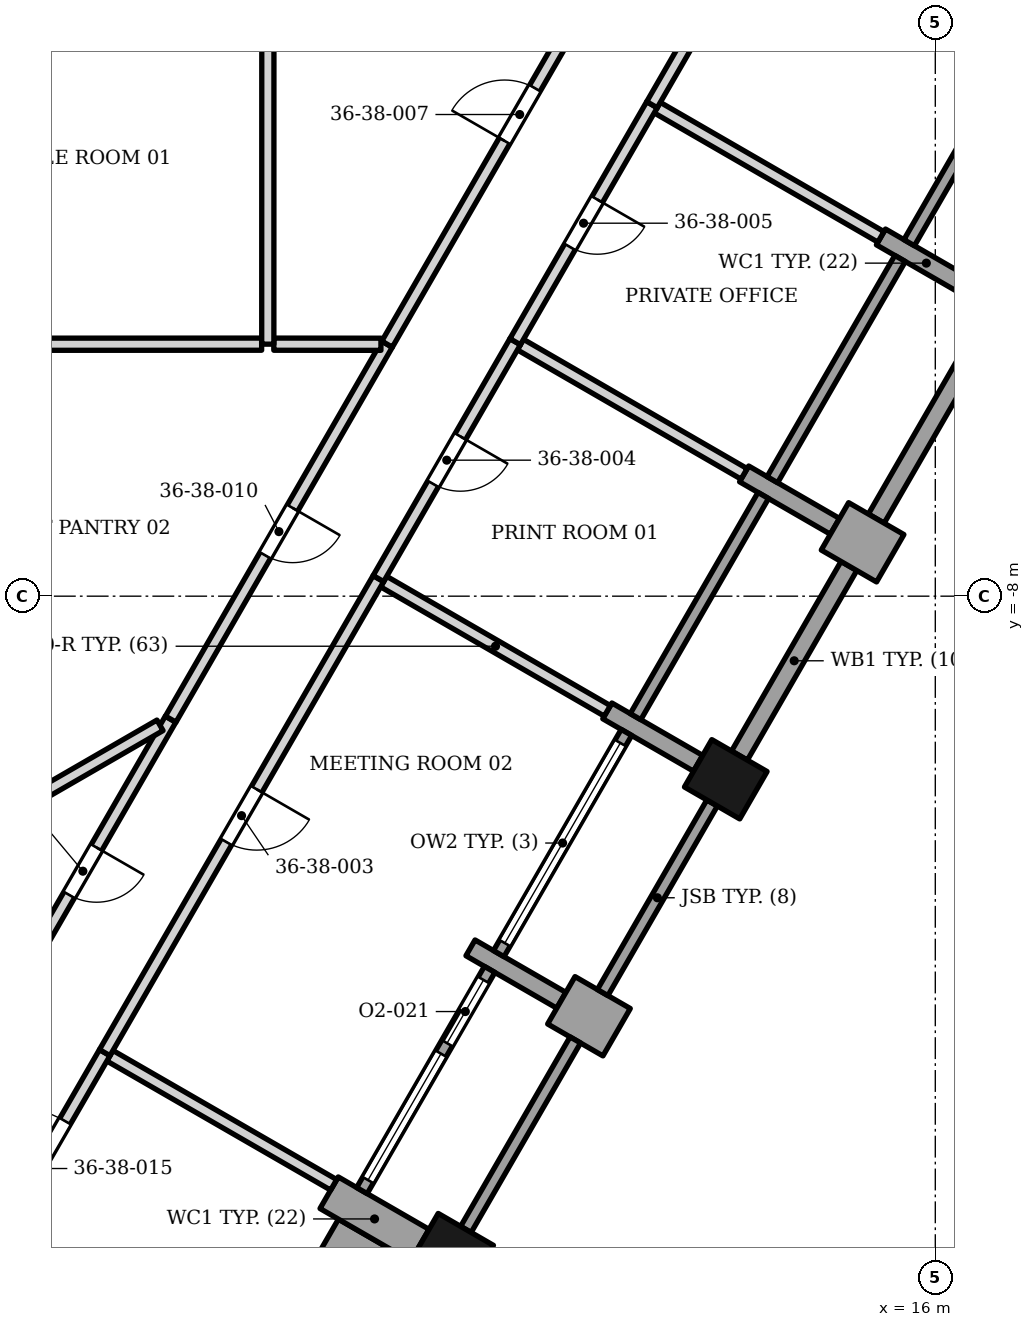
"""IFC4 building model, lengths in metres.
Left out: names, types, materials, properties, quantities, classifications, styles, units other than length and angle.
Written with IfcOpenShell. Run it as: python <this file> out.ifc"""

import sys

from ifc_helpers import new_model, si_unit, direction, frame, frame_2d, origin, origin_2d, place, context, subcontext, project, spatial, polyline, rectangle, outline, extrude, element, fill, save


model = new_model("IFC4")
c1 = context("Model", 3, precision=1e-05, world=origin(), true_north=direction((0.0, 1.0)))
c2 = subcontext(c1, "Body", "Model", "MODEL_VIEW")
j1 = project(units=[si_unit("LENGTHUNIT", "METRE"), si_unit("PLANEANGLEUNIT", "RADIAN")], contexts=[c1])
p1 = place(None, origin())
s1 = spatial("IfcSite", under=j1, at=p1, CompositionType="ELEMENT")
p2 = place(p1, origin())
s2 = spatial("IfcBuilding", under=s1, at=p2, CompositionType="ELEMENT")
p3 = place(p2, frame((0.0, 0.0, 156.3)))
s3 = spatial("IfcBuildingStorey", under=s2, at=p3, CompositionType="ELEMENT", Elevation=156.3)
for number, where, z_axis, x_axis in (
    (1, (8.054, -18.803, 0.0), (0.0, 0.0, 1.0), (0.5, 0.866, 0.0)),
    (2, (12.554, -11.011, 0.0), (0.0, 0.0, 1.0), (0.5, 0.866, 0.0)),
):
    element("IfcColumn", number, at=place(p3, frame(where, z_axis=z_axis, x_axis=x_axis)), inside=s3, PredefinedType="COLUMN", context=c2, shape_type="SweptSolid", body=[
        extrude(rectangle(XDim=0.9, YDim=1.05, at=origin_2d()), origin(), (0.0, 0.0, 1.0), 3.9),
    ])
p4 = place(p3, frame((7.525, -18.673, 0.0), z_axis=(0.0, 0.0, 1.0), x_axis=(-0.866074815912, 0.499914405916, 0.0)))
e3 = element("IfcWall", 3, at=p4, inside=s3, PredefinedType="SOLIDWALL", context=c2, shape_type="SweptSolid", body=[
    extrude(rectangle(XDim=1.725, YDim=0.6, at=frame_2d((0.862, 0.0))), origin(), (0.0, 0.0, 1.0), 3.0),
])
p5 = place(p3, frame((9.85, -14.646, 0.0), z_axis=(0.0, 0.0, 1.0), x_axis=(0.866030680601, -0.499990860175, 0.0)))
e4 = element("IfcWall", 4, at=p5, inside=s3, PredefinedType="SOLIDWALL", context=c2, shape_type="SweptSolid", body=[
    extrude(rectangle(XDim=1.05, YDim=0.9, at=frame_2d((0.525, 0.0))), origin(), (0.0, 0.0, 1.0), 3.0),
])
p6 = place(p3, frame((8.356, -13.783, 0.0), z_axis=(0.0, 0.0, 1.0), x_axis=(0.866013532718, -0.500020560727, 0.0)))
e5 = element("IfcWall", 5, at=p6, inside=s3, PredefinedType="SOLIDWALL", context=c2, shape_type="SweptSolid", body=[
    extrude(rectangle(XDim=1.725, YDim=0.3, at=frame_2d((0.863, 0.0))), origin(), (0.0, 0.0, 1.0), 3.0),
])
p7 = place(p3, frame((12.099, -10.749, 0.0), z_axis=(0.0, 0.0, 1.0), x_axis=(-0.86597814115, 0.500081852351, 0.0)))
e6 = element("IfcWall", 6, at=p7, inside=s3, PredefinedType="SOLIDWALL", context=c2, shape_type="SweptSolid", body=[
    extrude(rectangle(XDim=1.725, YDim=0.3, at=frame_2d((0.862, 0.0))), origin(), (0.0, 0.0, 1.0), 3.0),
])
p8 = place(p3, frame((14.35, -6.852, 0.0), z_axis=(0.0, 0.0, 1.0), x_axis=(0.866030680601, -0.499990860175, 0.0)))
e7 = element("IfcWall", 7, at=p8, inside=s3, PredefinedType="SOLIDWALL", context=c2, shape_type="SweptSolid", body=[
    extrude(rectangle(XDim=1.05, YDim=0.9, at=frame_2d((0.525, 0.0))), origin(), (0.0, 0.0, 1.0), 3.0),
])
p9 = place(p3, frame((14.35, -6.852, 0.0), z_axis=(0.0, 0.0, 1.0), x_axis=(-0.866013532718, 0.500020560727, 0.0)))
e8 = element("IfcWall", 8, at=p9, inside=s3, PredefinedType="SOLIDWALL", context=c2, shape_type="SweptSolid", body=[
    extrude(rectangle(XDim=1.725, YDim=0.3, at=frame_2d((0.863, 0.0))), origin(), (0.0, 0.0, 1.0), 3.0),
])
p10 = place(p3, frame((16.599, -2.954, 0.0), z_axis=(0.0, 0.0, 1.0), x_axis=(-0.86597814115, 0.500081852351, 0.0)))
e9 = element("IfcWall", 9, at=p10, inside=s3, PredefinedType="SOLIDWALL", context=c2, shape_type="SweptSolid", body=[
    extrude(rectangle(XDim=1.725, YDim=0.3, at=frame_2d((0.862, 0.0))), origin(), (0.0, 0.0, 1.0), 3.0),
])
p11 = place(p3, origin())
e10 = element("IfcWall", 10, at=p11, inside=s3, PredefinedType="SOLIDWALL", context=c2, shape_type="SweptSolid", body=[
    extrude(outline(polyline([(9.993, -15.248), (8.194, -18.364), (8.367, -18.464), (10.166, -15.348), (9.993, -15.248)])), origin(), (0.0, 0.0, 1.0), 3.0),
])
p12 = place(p3, frame((6.57, -17.775, 0.0), z_axis=(0.0, 0.0, 1.0), x_axis=(0.500027713859, 0.866009402589, 0.0)))
e11 = element("IfcWall", 11, at=p12, inside=s3, PredefinedType="ELEMENTEDWALL", context=c2, shape_type="SweptSolid", body=[
    extrude(rectangle(XDim=4.2, YDim=0.2, at=frame_2d((2.1, 0.0))), origin(), (0.0, 0.0, 1.0), 3.0),
])
p13 = place(p12, frame((0.2, 0.0, 0.45)))
e12 = element("IfcOpeningElement", 12, at=p13, cuts=e11, PredefinedType="OPENING", context=c2, shape_type="SweptSolid", body=[
    extrude(rectangle(XDim=2.4, YDim=2.25, at=frame_2d((1.2, 1.125))), frame((0.0, 0.11, 0.0), z_axis=(0.0, -1.0, 0.0), x_axis=(1.0, 0.0, 0.0)), (0.0, 0.0, 1.0), 0.22),
])
p14 = place(p12, frame((2.8, 0.0, 0.0)))
e13 = element("IfcOpeningElement", 13, at=p14, cuts=e11, PredefinedType="OPENING", context=c2, shape_type="SweptSolid", body=[
    extrude(rectangle(XDim=1.2, YDim=2.7, at=frame_2d((0.6, 1.35))), frame((0.0, 0.11, 0.0), z_axis=(0.0, -1.0, 0.0), x_axis=(1.0, 0.0, 0.0)), (0.0, 0.0, 1.0), 0.22),
])
p15 = place(p3, frame((10.529, -14.519, 0.0), z_axis=(0.0, 0.0, 1.0), x_axis=(0.500012057535, 0.866018442252, 0.0)))
e14 = element("IfcWall", 14, at=p15, inside=s3, PredefinedType="SOLIDWALL", context=c2, shape_type="SweptSolid", body=[
    extrude(rectangle(XDim=3.6, YDim=0.2, at=frame_2d((1.8, 0.0))), origin(), (0.0, 0.0, 1.0), 3.0),
])
p16 = place(p3, frame((8.82, -13.878, 0.0), z_axis=(0.0, 0.0, 1.0), x_axis=(0.500027713859, 0.866009402589, 0.0)))
e15 = element("IfcWall", 15, at=p16, inside=s3, PredefinedType="ELEMENTEDWALL", context=c2, shape_type="SweptSolid", body=[
    extrude(rectangle(XDim=4.2, YDim=0.2, at=frame_2d((2.1, 0.0))), origin(), (0.0, 0.0, 1.0), 2.95),
])
p17 = place(p16, frame((0.2, 0.0, 0.45)))
e16 = element("IfcOpeningElement", 16, at=p17, cuts=e15, PredefinedType="OPENING", context=c2, shape_type="SweptSolid", body=[
    extrude(rectangle(XDim=3.8, YDim=2.25, at=frame_2d((1.9, 1.125))), frame((0.0, 0.11, 0.0), z_axis=(0.0, -1.0, 0.0), x_axis=(1.0, 0.0, 0.0)), (0.0, 0.0, 1.0), 0.22),
])
p18 = place(p3, frame((12.779, -10.621, 0.0), z_axis=(0.0, 0.0, 1.0), x_axis=(0.500012057535, 0.866018442252, 0.0)))
e17 = element("IfcWall", 17, at=p18, inside=s3, PredefinedType="SOLIDWALL", context=c2, shape_type="SweptSolid", body=[
    extrude(rectangle(XDim=3.6, YDim=0.3, at=frame_2d((1.8, 0.0))), origin(), (0.0, 0.0, 1.0), 3.0),
])
p19 = place(p3, frame((11.07, -9.981, 0.0), z_axis=(0.0, 0.0, 1.0), x_axis=(0.500002543286, 0.866023935413, 0.0)))
e18 = element("IfcWall", 18, at=p19, inside=s3, PredefinedType="ELEMENTEDWALL", context=c2, shape_type="SweptSolid", body=[
    extrude(rectangle(XDim=4.2, YDim=0.2, at=frame_2d((2.1, 0.0))), origin(), (0.0, 0.0, 1.0), 3.0),
])
p20 = place(p3, frame((15.029, -6.724, 0.0), z_axis=(0.0, 0.0, 1.0), x_axis=(0.499982693035, 0.866035395735, 0.0)))
e19 = element("IfcWall", 19, at=p20, inside=s3, PredefinedType="SOLIDWALL", context=c2, shape_type="SweptSolid", body=[
    extrude(rectangle(XDim=3.6, YDim=0.3, at=frame_2d((1.8, 0.0))), origin(), (0.0, 0.0, 1.0), 3.0),
])
p21 = place(p3, frame((13.32, -6.084, 0.0), z_axis=(0.0, 0.0, 1.0), x_axis=(0.500027713859, 0.866009402589, 0.0)))
e20 = element("IfcWall", 20, at=p21, inside=s3, PredefinedType="ELEMENTEDWALL", context=c2, shape_type="SweptSolid", body=[
    extrude(rectangle(XDim=4.2, YDim=0.2, at=frame_2d((2.1, 0.0))), origin(), (0.0, 0.0, 1.0), 3.0),
])
p22 = place(p3, frame((15.57, -2.187, 0.0), z_axis=(0.0, 0.0, 1.0), x_axis=(0.500002543286, 0.866023935413, 0.0)))
e21 = element("IfcWall", 21, at=p22, inside=s3, PredefinedType="ELEMENTEDWALL", context=c2, shape_type="SweptSolid", body=[
    extrude(rectangle(XDim=4.2, YDim=0.2, at=frame_2d((2.1, 0.0))), origin(), (0.0, 0.0, 1.0), 3.0),
])
p23 = place(p3, frame((5.838, -18.844, 0.0), z_axis=(0.0, 0.0, 1.0), x_axis=(0.865997808697, -0.500047793048, 0.0)))
e22 = element("IfcWall", 22, at=p23, inside=s3, PredefinedType="SOLIDWALL", context=c2, shape_type="SweptSolid", body=[
    extrude(rectangle(XDim=2.425, YDim=1.384, at=frame_2d((1.212, 0.0))), origin(), (0.0, 0.0, 1.0), 3.0),
])
p24 = place(p3, frame((2.425, -15.557, 0.0), z_axis=(0.0, 0.0, 1.0), x_axis=(0.866217148336, -0.499667741532, 0.0)))
e23 = element("IfcWall", 23, at=p24, inside=s3, PredefinedType="PARTITIONING", context=c2, shape_type="SweptSolid", body=[
    extrude(rectangle(XDim=4.25, YDim=0.2, at=frame_2d((2.125, 0.0))), origin(), (0.0, 0.0, 1.0), 3.052),
])
p25 = place(p3, frame((0.137, -15.717, 0.0), z_axis=(0.0, 0.0, 1.0), x_axis=(0.499742818956, 0.866173836422, 0.0)))
e24 = element("IfcWall", 24, at=p25, inside=s3, PredefinedType="PARTITIONING", context=c2, shape_type="SweptSolid", body=[
    extrude(rectangle(XDim=6.573, YDim=0.2, at=frame_2d((3.286, 0.0))), origin(), (0.0, 0.0, 1.0), 2.884),
])
p26 = place(p25, frame((3.238, 0.0, 0.0)))
e25 = element("IfcOpeningElement", 25, at=p26, cuts=e24, PredefinedType="OPENING", context=c2, shape_type="SweptSolid", body=[
    extrude(rectangle(XDim=0.9, YDim=2.1, at=frame_2d((0.45, 1.05))), frame((0.0, 0.11, 0.0), z_axis=(0.0, -1.0, 0.0), x_axis=(1.0, 0.0, 0.0)), (0.0, 0.0, 1.0), 0.22),
])
p27 = place(p3, frame((0.188, -19.231, 0.0), z_axis=(0.0, 0.0, 1.0), x_axis=(0.500313526201, 0.865844313662, 0.0)))
e26 = element("IfcWall", 26, at=p27, inside=s3, PredefinedType="PARTITIONING", context=c2, shape_type="SweptSolid", body=[
    extrude(rectangle(XDim=4.302, YDim=0.2, at=frame_2d((2.151, 0.0))), origin(), (0.0, 0.0, 1.0), 3.128),
])
p28 = place(p27, frame((1.201, 0.0, 0.0)))
e27 = element("IfcOpeningElement", 27, at=p28, cuts=e26, PredefinedType="OPENING", context=c2, shape_type="SweptSolid", body=[
    extrude(rectangle(XDim=1.8, YDim=2.4, at=frame_2d((0.9, 1.2))), frame((0.0, 0.11, 0.0), z_axis=(0.0, -1.0, 0.0), x_axis=(1.0, 0.0, 0.0)), (0.0, 0.0, 1.0), 0.22),
])
p29 = place(p3, frame((0.7, -11.596, 0.0), z_axis=(0.0, 0.0, 1.0), x_axis=(0.866014325049, 0.500019188443, 0.0)))
e28 = element("IfcWall", 28, at=p29, inside=s3, PredefinedType="PARTITIONING", context=c2, shape_type="SweptSolid", body=[
    extrude(rectangle(XDim=2.944, YDim=0.2, at=frame_2d((1.472, 0.0))), origin(), (0.0, 0.0, 1.0), 3.73),
])
p30 = place(p3, frame((3.426, -10.022, 0.0), z_axis=(0.0, 0.0, 1.0), x_axis=(0.499791742778, 0.866145607765, 0.0)))
e29 = element("IfcWall", 29, at=p30, inside=s3, PredefinedType="PARTITIONING", context=c2, shape_type="SweptSolid", body=[
    extrude(rectangle(XDim=7.117, YDim=0.2, at=frame_2d((3.559, 0.0))), origin(), (0.0, 0.0, 1.0), 2.884),
])
p31 = place(p30, frame((3.11, 0.0, 0.0)))
e30 = element("IfcOpeningElement", 30, at=p31, cuts=e29, PredefinedType="OPENING", context=c2, shape_type="SweptSolid", body=[
    extrude(rectangle(XDim=0.9, YDim=2.1, at=frame_2d((0.45, 1.05))), frame((0.0, 0.11, 0.0), z_axis=(0.0, -1.0, 0.0), x_axis=(1.0, 0.0, 0.0)), (0.0, 0.0, 1.0), 0.22),
])
p32 = place(p3, frame((6.928, -7.76, 0.0), z_axis=(0.0, 0.0, 1.0), x_axis=(0.86582081126, -0.500354197333, 0.0)))
e31 = element("IfcWall", 31, at=p32, inside=s3, PredefinedType="PARTITIONING", context=c2, shape_type="SweptSolid", body=[
    extrude(rectangle(XDim=4.248, YDim=0.2, at=frame_2d((2.124, 0.0))), origin(), (0.0, 0.0, 1.0), 3.052),
])
p33 = place(p3, frame((2.34, -15.506, 0.0), z_axis=(0.0, 0.0, 1.0), x_axis=(0.5000018851, 0.866024315419, 0.0)))
e32 = element("IfcWall", 32, at=p33, inside=s3, PredefinedType="PARTITIONING", context=c2, shape_type="SweptSolid", body=[
    extrude(rectangle(XDim=9.0, YDim=0.2, at=frame_2d((4.5, 0.0))), origin(), (0.0, 0.0, 1.0), 2.884),
])
p34 = place(p33, frame((4.0, 0.0, 0.0)))
e33 = element("IfcOpeningElement", 33, at=p34, cuts=e32, PredefinedType="OPENING", context=c2, shape_type="SweptSolid", body=[
    extrude(rectangle(XDim=1.0, YDim=2.1, at=frame_2d((0.5, 1.05))), frame((0.0, 0.11, 0.0), z_axis=(0.0, -1.0, 0.0), x_axis=(1.0, 0.0, 0.0)), (0.0, 0.0, 1.0), 0.22),
])
p35 = place(p3, frame((-1.232, -3.857, 0.0), z_axis=(0.0, 0.0, 1.0), x_axis=(0.999999961423, 0.000277766745, 0.0)))
e34 = element("IfcWall", 34, at=p35, inside=s3, PredefinedType="PARTITIONING", context=c2, shape_type="SweptSolid", body=[
    extrude(rectangle(XDim=6.153, YDim=0.2, at=frame_2d((3.076, 0.0))), origin(), (0.0, 0.0, 1.0), 3.73),
])
p36 = place(p3, frame((5.121, -3.856, 0.0), z_axis=(0.0, 0.0, 1.0), x_axis=(0.999999529486, -0.000970066062, 0.0)))
e35 = element("IfcWall", 35, at=p36, inside=s3, PredefinedType="PARTITIONING", context=c2, shape_type="SweptSolid", body=[
    extrude(rectangle(XDim=1.762, YDim=0.2, at=frame_2d((0.881, 0.0))), origin(), (0.0, 0.0, 1.0), 3.73),
])
p37 = place(p3, frame((6.984, -3.855, 0.0), z_axis=(0.0, 0.0, 1.0), x_axis=(0.500195547237, 0.865912475095, 0.0)))
e36 = element("IfcWall", 36, at=p37, inside=s3, PredefinedType="PARTITIONING", context=c2, shape_type="SweptSolid", body=[
    extrude(rectangle(XDim=8.725, YDim=0.2, at=frame_2d((4.363, 0.0))), origin(), (0.0, 0.0, 1.0), 3.052),
])
p38 = place(p37, frame((3.861, 0.0, 0.0)))
e37 = element("IfcOpeningElement", 37, at=p38, cuts=e36, PredefinedType="OPENING", context=c2, shape_type="SweptSolid", body=[
    extrude(rectangle(XDim=1.0, YDim=2.1, at=frame_2d((0.5, 1.05))), frame((0.0, 0.11, 0.0), z_axis=(0.0, -1.0, 0.0), x_axis=(1.0, 0.0, 0.0)), (0.0, 0.0, 1.0), 0.22),
])
p39 = place(p3, frame((9.176, -3.862, 0.0), z_axis=(0.0, 0.0, 1.0), x_axis=(0.865807555134, -0.500377135241, 0.0)))
e38 = element("IfcWall", 38, at=p39, inside=s3, PredefinedType="PARTITIONING", context=c2, shape_type="SweptSolid", body=[
    extrude(rectangle(XDim=4.25, YDim=0.2, at=frame_2d((2.125, 0.0))), origin(), (0.0, 0.0, 1.0), 3.052),
])
p40 = place(p3, frame((6.841, -7.71, 0.0), z_axis=(0.0, 0.0, 1.0), x_axis=(0.499974615194, 0.866040059213, 0.0)))
e39 = element("IfcWall", 39, at=p40, inside=s3, PredefinedType="PARTITIONING", context=c2, shape_type="SweptSolid", body=[
    extrude(rectangle(XDim=4.498, YDim=0.2, at=frame_2d((2.249, 0.0))), origin(), (0.0, 0.0, 1.0), 3.052),
])
p41 = place(p40, frame((1.798, 0.0, 0.0)))
e40 = element("IfcOpeningElement", 40, at=p41, cuts=e39, PredefinedType="OPENING", context=c2, shape_type="SweptSolid", body=[
    extrude(rectangle(XDim=0.9, YDim=2.1, at=frame_2d((0.45, 1.05))), frame((0.0, 0.11, 0.0), z_axis=(0.0, -1.0, 0.0), x_axis=(1.0, 0.0, 0.0)), (0.0, 0.0, 1.0), 0.22),
])
p42 = place(p3, frame((11.427, 0.035, 0.0), z_axis=(0.0, 0.0, 1.0), x_axis=(0.865857330643, -0.500290998291, 0.0)))
e41 = element("IfcWall", 41, at=p42, inside=s3, PredefinedType="PARTITIONING", context=c2, shape_type="SweptSolid", body=[
    extrude(rectangle(XDim=4.25, YDim=0.2, at=frame_2d((2.125, 0.0))), origin(), (0.0, 0.0, 1.0), 3.052),
])
p43 = place(p3, frame((9.09, -3.815, 0.0), z_axis=(0.0, 0.0, 1.0), x_axis=(0.499972939495, 0.866041026611, 0.0)))
e42 = element("IfcWall", 42, at=p43, inside=s3, PredefinedType="PARTITIONING", context=c2, shape_type="SweptSolid", body=[
    extrude(rectangle(XDim=4.5, YDim=0.2, at=frame_2d((2.25, 0.0))), origin(), (0.0, 0.0, 1.0), 3.052),
])
p44 = place(p43, frame((1.8, 0.0, 0.0)))
e43 = element("IfcOpeningElement", 43, at=p44, cuts=e42, PredefinedType="OPENING", context=c2, shape_type="SweptSolid", body=[
    extrude(rectangle(XDim=0.9, YDim=2.1, at=frame_2d((0.45, 1.05))), frame((0.0, 0.11, 0.0), z_axis=(0.0, -1.0, 0.0), x_axis=(1.0, 0.0, 0.0)), (0.0, 0.0, 1.0), 0.22),
])
p45 = place(p3, frame((11.341, 0.083, 0.0), z_axis=(0.0, 0.0, 1.0), x_axis=(0.499673523279, 0.866213813174, 0.0)))
e44 = element("IfcWall", 44, at=p45, inside=s3, PredefinedType="PARTITIONING", context=c2, shape_type="SweptSolid", body=[
    extrude(rectangle(XDim=4.176, YDim=0.2, at=frame_2d((2.088, 0.0))), origin(), (0.0, 0.0, 1.0), 3.052),
])
p46 = place(p3, frame((5.022, -3.855, 0.0), z_axis=(0.0, 0.0, 1.0), x_axis=(0.000218538286, 0.999999976121, 0.0)))
e45 = element("IfcWall", 45, at=p46, inside=s3, PredefinedType="PARTITIONING", context=c2, shape_type="SweptSolid", body=[
    extrude(rectangle(XDim=7.82, YDim=0.2, at=frame_2d((3.91, 0.0))), origin(), (0.0, 0.0, 1.0), 3.73),
])
p47 = place(p13, origin())
e46 = element("IfcWindow", 46, at=p47, inside=s3, PartitioningType="SINGLE_PANEL", PredefinedType="WINDOW", context=c2, shape_type="SweptSolid", body=[
    extrude(rectangle(XDim=2.4, YDim=2.25, at=frame_2d((1.2, 1.125))), frame((0.0, 0.03, 0.0), z_axis=(0.0, -1.0, 0.0), x_axis=(1.0, 0.0, 0.0)), (0.0, 0.0, 1.0), 0.06),
])
fill(e12, e46)
p48 = place(p14, origin())
e47 = element("IfcDoor", 47, at=p48, inside=s3, OperationType="SINGLE_SWING_LEFT", PredefinedType="DOOR", context=c2, shape_type="SweptSolid", body=[
    extrude(rectangle(XDim=1.2, YDim=2.7, at=frame_2d((0.6, 1.35))), frame((0.0, 0.025, 0.0), z_axis=(0.0, -1.0, 0.0), x_axis=(1.0, 0.0, 0.0)), (0.0, 0.0, 1.0), 0.05),
])
fill(e13, e47)
p49 = place(p17, origin())
e48 = element("IfcWindow", 48, at=p49, inside=s3, PartitioningType="SINGLE_PANEL", PredefinedType="WINDOW", context=c2, shape_type="SweptSolid", body=[
    extrude(rectangle(XDim=3.8, YDim=2.25, at=frame_2d((1.9, 1.125))), frame((0.0, 0.03, 0.0), z_axis=(0.0, -1.0, 0.0), x_axis=(1.0, 0.0, 0.0)), (0.0, 0.0, 1.0), 0.06),
])
fill(e16, e48)
p50 = place(p34, origin())
e49 = element("IfcDoor", 49, at=p50, inside=s3, OperationType="SINGLE_SWING_RIGHT", PredefinedType="DOOR", context=c2, shape_type="SweptSolid", body=[
    extrude(rectangle(XDim=1.0, YDim=2.1, at=frame_2d((0.5, 1.05))), frame((0.0, 0.025, 0.0), z_axis=(0.0, -1.0, 0.0), x_axis=(1.0, 0.0, 0.0)), (0.0, 0.0, 1.0), 0.05),
])
fill(e33, e49)
p51 = place(p41, origin())
e50 = element("IfcDoor", 50, at=p51, inside=s3, OperationType="SINGLE_SWING_RIGHT", PredefinedType="DOOR", context=c2, shape_type="SweptSolid", body=[
    extrude(rectangle(XDim=0.9, YDim=2.1, at=frame_2d((0.45, 1.05))), frame((0.0, 0.025, 0.0), z_axis=(0.0, -1.0, 0.0), x_axis=(1.0, 0.0, 0.0)), (0.0, 0.0, 1.0), 0.05),
])
fill(e40, e50)
p52 = place(p44, origin())
e51 = element("IfcDoor", 51, at=p52, inside=s3, OperationType="SINGLE_SWING_RIGHT", PredefinedType="DOOR", context=c2, shape_type="SweptSolid", body=[
    extrude(rectangle(XDim=0.9, YDim=2.1, at=frame_2d((0.45, 1.05))), frame((0.0, 0.025, 0.0), z_axis=(0.0, -1.0, 0.0), x_axis=(1.0, 0.0, 0.0)), (0.0, 0.0, 1.0), 0.05),
])
fill(e43, e51)
p53 = place(p38, origin())
e52 = element("IfcDoor", 52, at=p53, inside=s3, OperationType="SINGLE_SWING_LEFT", PredefinedType="DOOR", context=c2, shape_type="SweptSolid", body=[
    extrude(rectangle(XDim=1.0, YDim=2.1, at=frame_2d((0.5, 1.05))), frame((0.0, 0.025, 0.0), z_axis=(0.0, -1.0, 0.0), x_axis=(1.0, 0.0, 0.0)), (0.0, 0.0, 1.0), 0.05),
])
fill(e37, e52)
p54 = place(p26, origin())
e53 = element("IfcDoor", 53, at=p54, inside=s3, OperationType="SINGLE_SWING_RIGHT", PredefinedType="DOOR", context=c2, shape_type="SweptSolid", body=[
    extrude(rectangle(XDim=0.9, YDim=2.1, at=frame_2d((0.45, 1.05))), frame((0.0, 0.025, 0.0), z_axis=(0.0, -1.0, 0.0), x_axis=(1.0, 0.0, 0.0)), (0.0, 0.0, 1.0), 0.05),
])
fill(e25, e53)
p55 = place(p31, origin())
e54 = element("IfcDoor", 54, at=p55, inside=s3, OperationType="SINGLE_SWING_RIGHT", PredefinedType="DOOR", context=c2, shape_type="SweptSolid", body=[
    extrude(rectangle(XDim=0.9, YDim=2.1, at=frame_2d((0.45, 1.05))), frame((0.0, 0.025, 0.0), z_axis=(0.0, -1.0, 0.0), x_axis=(1.0, 0.0, 0.0)), (0.0, 0.0, 1.0), 0.05),
])
fill(e30, e54)
p56 = place(p28, origin())
e55 = element("IfcDoor", 55, at=p56, inside=s3, OperationType="DOUBLE_DOOR_SINGLE_SWING", PredefinedType="DOOR", context=c2, shape_type="SweptSolid", body=[
    extrude(rectangle(XDim=1.8, YDim=2.4, at=frame_2d((0.9, 1.2))), frame((0.0, 0.025, 0.0), z_axis=(0.0, -1.0, 0.0), x_axis=(1.0, 0.0, 0.0)), (0.0, 0.0, 1.0), 0.05),
])
fill(e27, e55)
save(model, sys.argv[1])
